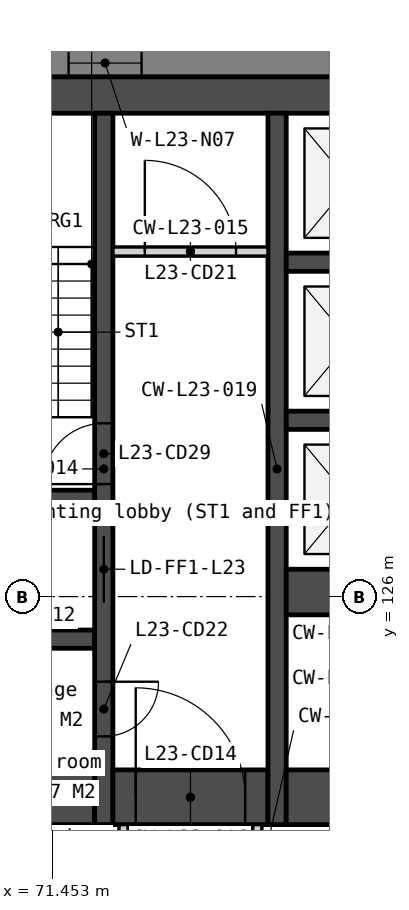
"""IFC4 building model, lengths in metres.
Left out: names, types, materials, properties, quantities, classifications, styles, units other than length and angle.
Written with IfcOpenShell. Run it as: python <this file> out.ifc"""

import sys

from ifc_helpers import new_model, si_unit, direction, frame, frame_2d, origin, place, context, subcontext, project, spatial, polyline, rectangle, outline, extrude, element, fill, save


model = new_model("IFC4")
c1 = context("Model", 3, precision=1e-05, world=origin(), true_north=direction((0.0, 1.0)))
c2 = subcontext(c1, "Body", "Model", "MODEL_VIEW")
j1 = project(units=[si_unit("LENGTHUNIT", "METRE"), si_unit("PLANEANGLEUNIT", "RADIAN")], contexts=[c1])
p1 = place(None, origin())
s1 = spatial("IfcSite", under=j1, at=p1, CompositionType="ELEMENT")
p2 = place(p1, origin())
s2 = spatial("IfcBuilding", under=s1, at=p2, CompositionType="ELEMENT")
p3 = place(p2, frame((0.0, 0.0, 95.8)))
s3 = spatial("IfcBuildingStorey", under=s2, at=p3, CompositionType="ELEMENT", Elevation=95.8)
p4 = place(p3, frame((66.0, 134.25, 0.0), z_axis=(0.0, 0.0, 1.0), x_axis=(1.0, 0.0, 0.0)))
e1 = element("IfcWall", 1, at=p4, inside=s3, PredefinedType="SOLIDWALL", context=c2, shape_type="SweptSolid", body=[
    extrude(rectangle(XDim=28.0, YDim=0.6, at=frame_2d((14.0, 0.0))), origin(), (0.0, 0.0, 1.0), 3.35),
])
for number, where, z_axis, x_axis in (
    (2, (69.6, 127.6, 0.0), (0.0, 0.0, 1.0), (1.0, 0.0, 0.0)),
    (3, (69.6, 125.3, 0.0), (0.0, 0.0, 1.0), (1.0, 0.0, 0.0)),
):
    element("IfcWall", number, at=place(p3, frame(where, z_axis=z_axis, x_axis=x_axis)), inside=s3, PredefinedType="SOLIDWALL", context=c2, shape_type="SweptSolid", body=[
        extrude(rectangle(XDim=2.55, YDim=0.3, at=frame_2d((1.275, 0.0))), origin(), (0.0, 0.0, 1.0), 3.35),
    ])
p5 = place(p3, frame((69.6, 122.7, 0.0), z_axis=(0.0, 0.0, 1.0), x_axis=(1.0, 0.0, 0.0)))
e4 = element("IfcWall", 4, at=p5, inside=s3, PredefinedType="SOLIDWALL", context=c2, shape_type="SweptSolid", body=[
    extrude(rectangle(XDim=2.55, YDim=0.9, at=frame_2d((1.275, 0.0))), origin(), (0.0, 0.0, 1.0), 3.35),
])
p6 = place(p3, frame((72.3, 133.95, 0.0), z_axis=(0.0, 0.0, 1.0), x_axis=(0.0, -1.0, 0.0)))
e5 = element("IfcWall", 5, at=p6, inside=s3, PredefinedType="SOLIDWALL", context=c2, shape_type="SweptSolid", body=[
    extrude(rectangle(XDim=11.7, YDim=0.3, at=frame_2d((5.85, 0.0))), origin(), (0.0, 0.0, 1.0), 3.35),
])
p7 = place(p6, frame((6.95, 0.0, 0.0)))
e6 = element("IfcOpeningElement", 6, at=p7, cuts=e5, PredefinedType="OPENING", context=c2, shape_type="SweptSolid", body=[
    extrude(rectangle(XDim=1.1, YDim=2.1, at=frame_2d((0.55, 1.05))), frame((0.0, 0.16, 0.0), z_axis=(0.0, -1.0, 0.0), x_axis=(1.0, 0.0, 0.0)), (0.0, 0.0, 1.0), 0.32),
])
p8 = place(p6, frame((9.35, 0.0, 0.0)))
e7 = element("IfcOpeningElement", 7, at=p8, cuts=e5, PredefinedType="OPENING", context=c2, shape_type="SweptSolid", body=[
    extrude(rectangle(XDim=0.9, YDim=2.1, at=frame_2d((0.45, 1.05))), frame((0.0, 0.16, 0.0), z_axis=(0.0, -1.0, 0.0), x_axis=(1.0, 0.0, 0.0)), (0.0, 0.0, 1.0), 0.32),
])
p9 = place(p6, frame((5.1, 0.0, 0.0)))
e8 = element("IfcOpeningElement", 8, at=p9, cuts=e5, PredefinedType="OPENING", context=c2, shape_type="SweptSolid", body=[
    extrude(rectangle(XDim=1.0, YDim=2.1, at=frame_2d((0.5, 1.05))), frame((0.0, 0.16, 0.0), z_axis=(0.0, -1.0, 0.0), x_axis=(1.0, 0.0, 0.0)), (0.0, 0.0, 1.0), 0.32),
])
p10 = place(p3, frame((72.45, 131.675, 0.0), z_axis=(0.0, 0.0, 1.0), x_axis=(1.0, 0.0, 0.0)))
e9 = element("IfcWall", 9, at=p10, inside=s3, PredefinedType="PARTITIONING", context=c2, shape_type="SweptSolid", body=[
    extrude(rectangle(XDim=2.55, YDim=0.15, at=frame_2d((1.275, 0.0))), origin(), (0.0, 0.0, 1.0), 3.35),
])
p11 = place(p10, frame((0.525, 0.0, 0.0)))
e10 = element("IfcOpeningElement", 10, at=p11, cuts=e9, PredefinedType="OPENING", context=c2, shape_type="SweptSolid", body=[
    extrude(rectangle(XDim=1.5, YDim=2.1, at=frame_2d((0.75, 1.05))), frame((0.0, 0.085, 0.0), z_axis=(0.0, -1.0, 0.0), x_axis=(1.0, 0.0, 0.0)), (0.0, 0.0, 1.0), 0.17),
])
p12 = place(p3, frame((72.45, 122.7, 0.0), z_axis=(0.0, 0.0, 1.0), x_axis=(1.0, 0.0, 0.0)))
e11 = element("IfcWall", 11, at=p12, inside=s3, PredefinedType="SOLIDWALL", context=c2, shape_type="SweptSolid", body=[
    extrude(rectangle(XDim=2.55, YDim=0.9, at=frame_2d((1.275, 0.0))), origin(), (0.0, 0.0, 1.0), 3.35),
])
p13 = place(p12, frame((0.375, 0.0, 0.0)))
e12 = element("IfcOpeningElement", 12, at=p13, cuts=e11, PredefinedType="OPENING", context=c2, shape_type="SweptSolid", body=[
    extrude(rectangle(XDim=1.8, YDim=2.1, at=frame_2d((0.9, 1.05))), frame((0.0, 0.46, 0.0), z_axis=(0.0, -1.0, 0.0), x_axis=(1.0, 0.0, 0.0)), (0.0, 0.0, 1.0), 0.92),
])
for number, where, z_axis, x_axis in (
    (13, (72.625, 122.25, 0.0), (0.0, 0.0, 1.0), (0.0, -1.0, 0.0)),
    (14, (74.825, 122.25, 0.0), (0.0, 0.0, 1.0), (0.0, -1.0, 0.0)),
):
    element("IfcWall", number, at=place(p3, frame(where, z_axis=z_axis, x_axis=x_axis)), inside=s3, PredefinedType="PARTITIONING", context=c2, shape_type="SweptSolid", body=[
        extrude(rectangle(XDim=2.1, YDim=0.15, at=frame_2d((1.05, 0.0))), origin(), (0.0, 0.0, 1.0), 3.35),
    ])
p14 = place(p3, frame((75.15, 133.95, 0.0), z_axis=(0.0, 0.0, 1.0), x_axis=(0.0, -1.0, 0.0)))
e15 = element("IfcWall", 15, at=p14, inside=s3, PredefinedType="SOLIDWALL", context=c2, shape_type="SweptSolid", body=[
    extrude(rectangle(XDim=11.7, YDim=0.3, at=frame_2d((5.85, 0.0))), origin(), (0.0, 0.0, 1.0), 3.35),
])
for number, where, z_axis, x_axis in (
    (16, (75.3, 131.5, 0.0), (0.0, 0.0, 1.0), (1.0, 0.0, 0.0)),
    (17, (75.3, 128.9, 0.0), (0.0, 0.0, 1.0), (1.0, 0.0, 0.0)),
):
    element("IfcWall", number, at=place(p3, frame(where, z_axis=z_axis, x_axis=x_axis)), inside=s3, PredefinedType="SOLIDWALL", context=c2, shape_type="SweptSolid", body=[
        extrude(rectangle(XDim=2.1, YDim=0.3, at=frame_2d((1.05, 0.0))), origin(), (0.0, 0.0, 1.0), 3.35),
    ])
p15 = place(p3, frame((75.3, 126.075, 0.0), z_axis=(0.0, 0.0, 1.0), x_axis=(1.0, 0.0, 0.0)))
e18 = element("IfcWall", 18, at=p15, inside=s3, PredefinedType="SOLIDWALL", context=c2, shape_type="SweptSolid", body=[
    extrude(rectangle(XDim=2.1, YDim=0.75, at=frame_2d((1.05, 0.0))), origin(), (0.0, 0.0, 1.0), 3.35),
])
p16 = place(p3, frame((75.3, 122.7, 0.0), z_axis=(0.0, 0.0, 1.0), x_axis=(1.0, 0.0, 0.0)))
e19 = element("IfcWall", 19, at=p16, inside=s3, PredefinedType="SOLIDWALL", context=c2, shape_type="SweptSolid", body=[
    extrude(rectangle(XDim=6.2, YDim=0.9, at=frame_2d((3.1, 0.0))), origin(), (0.0, 0.0, 1.0), 3.35),
])
p17 = place(p3, frame((101.322, 134.775, -0.15), z_axis=(0.0, 0.0, 1.0), x_axis=(-1.0, 0.0, 0.0)))
e20 = element("IfcWall", 20, at=p17, inside=s3, PredefinedType="SOLIDWALL", context=c2, shape_type="SweptSolid", body=[
    extrude(outline(polyline([(0.0, 0.0), (0.0, 3.5), (36.779, 3.5), (36.779, 0.0), (0.0, 0.0)])), frame((0.0, 0.225, 0.0), z_axis=(0.0, -1.0, 0.0), x_axis=(1.0, 0.0, 0.0)), (0.0, 0.0, 1.0), 0.45),
])
p18 = place(p17, frame((2.814, 0.0, 1.05)))
e21 = element("IfcOpeningElement", 21, at=p18, cuts=e20, PredefinedType="OPENING", context=c2, shape_type="SweptSolid", body=[
    extrude(rectangle(XDim=1.2, YDim=1.5, at=frame_2d((0.6, 0.75))), frame((0.0, 0.235, 0.0), z_axis=(0.0, -1.0, 0.0), x_axis=(1.0, 0.0, 0.0)), (0.0, 0.0, 1.0), 0.47),
])
p19 = place(p17, frame((4.514, 0.0, 1.05)))
e22 = element("IfcOpeningElement", 22, at=p19, cuts=e20, PredefinedType="OPENING", context=c2, shape_type="SweptSolid", body=[
    extrude(rectangle(XDim=1.2, YDim=1.5, at=frame_2d((0.6, 0.75))), frame((0.0, 0.235, 0.0), z_axis=(0.0, -1.0, 0.0), x_axis=(1.0, 0.0, 0.0)), (0.0, 0.0, 1.0), 0.47),
])
p20 = place(p17, frame((11.343, 0.0, 1.05)))
e23 = element("IfcOpeningElement", 23, at=p20, cuts=e20, PredefinedType="OPENING", context=c2, shape_type="SweptSolid", body=[
    extrude(rectangle(XDim=1.2, YDim=1.5, at=frame_2d((0.6, 0.75))), frame((0.0, 0.235, 0.0), z_axis=(0.0, -1.0, 0.0), x_axis=(1.0, 0.0, 0.0)), (0.0, 0.0, 1.0), 0.47),
])
p21 = place(p17, frame((13.043, 0.0, 1.05)))
e24 = element("IfcOpeningElement", 24, at=p21, cuts=e20, PredefinedType="OPENING", context=c2, shape_type="SweptSolid", body=[
    extrude(rectangle(XDim=1.2, YDim=1.5, at=frame_2d((0.6, 0.75))), frame((0.0, 0.235, 0.0), z_axis=(0.0, -1.0, 0.0), x_axis=(1.0, 0.0, 0.0)), (0.0, 0.0, 1.0), 0.47),
])
p22 = place(p17, frame((19.872, 0.0, 1.05)))
e25 = element("IfcOpeningElement", 25, at=p22, cuts=e20, PredefinedType="OPENING", context=c2, shape_type="SweptSolid", body=[
    extrude(rectangle(XDim=1.2, YDim=1.5, at=frame_2d((0.6, 0.75))), frame((0.0, 0.235, 0.0), z_axis=(0.0, -1.0, 0.0), x_axis=(1.0, 0.0, 0.0)), (0.0, 0.0, 1.0), 0.47),
])
p23 = place(p17, frame((21.572, 0.0, 1.05)))
e26 = element("IfcOpeningElement", 26, at=p23, cuts=e20, PredefinedType="OPENING", context=c2, shape_type="SweptSolid", body=[
    extrude(rectangle(XDim=1.2, YDim=1.5, at=frame_2d((0.6, 0.75))), frame((0.0, 0.235, 0.0), z_axis=(0.0, -1.0, 0.0), x_axis=(1.0, 0.0, 0.0)), (0.0, 0.0, 1.0), 0.47),
])
p24 = place(p17, frame((28.4, 0.0, 1.05)))
e27 = element("IfcOpeningElement", 27, at=p24, cuts=e20, PredefinedType="OPENING", context=c2, shape_type="SweptSolid", body=[
    extrude(rectangle(XDim=1.2, YDim=1.5, at=frame_2d((0.6, 0.75))), frame((0.0, 0.235, 0.0), z_axis=(0.0, -1.0, 0.0), x_axis=(1.0, 0.0, 0.0)), (0.0, 0.0, 1.0), 0.47),
])
p25 = place(p17, frame((30.1, 0.0, 1.05)))
e28 = element("IfcOpeningElement", 28, at=p25, cuts=e20, PredefinedType="OPENING", context=c2, shape_type="SweptSolid", body=[
    extrude(rectangle(XDim=1.2, YDim=1.5, at=frame_2d((0.6, 0.75))), frame((0.0, 0.235, 0.0), z_axis=(0.0, -1.0, 0.0), x_axis=(1.0, 0.0, 0.0)), (0.0, 0.0, 1.0), 0.47),
])
p26 = place(p3, frame((56.073, 130.263, -0.15), z_axis=(0.0, 0.0, 1.0), x_axis=(0.500000478905, -0.866025127289, 0.0)))
e29 = element("IfcWall", 29, at=p26, inside=s3, PredefinedType="SOLIDWALL", context=c2, shape_type="SweptSolid", body=[
    extrude(outline(polyline([(42.643, 0.0), (42.643, 3.5), (0.0, 3.5), (0.0, 0.0), (42.643, 0.0)])), frame((0.0, 0.225, 0.0), z_axis=(0.0, -1.0, 0.0), x_axis=(1.0, 0.0, 0.0)), (0.0, 0.0, 1.0), 0.45),
])
p27 = place(p26, frame((2.814, 0.0, 1.05)))
e30 = element("IfcOpeningElement", 30, at=p27, cuts=e29, PredefinedType="OPENING", context=c2, shape_type="SweptSolid", body=[
    extrude(rectangle(XDim=1.2, YDim=1.5, at=frame_2d((0.6, 0.75))), frame((0.0, 0.235, 0.0), z_axis=(0.0, -1.0, 0.0), x_axis=(1.0, 0.0, 0.0)), (0.0, 0.0, 1.0), 0.47),
])
p28 = place(p26, frame((4.514, 0.0, 1.05)))
e31 = element("IfcOpeningElement", 31, at=p28, cuts=e29, PredefinedType="OPENING", context=c2, shape_type="SweptSolid", body=[
    extrude(rectangle(XDim=1.2, YDim=1.5, at=frame_2d((0.6, 0.75))), frame((0.0, 0.235, 0.0), z_axis=(0.0, -1.0, 0.0), x_axis=(1.0, 0.0, 0.0)), (0.0, 0.0, 1.0), 0.47),
])
p29 = place(p26, frame((11.343, 0.0, 1.05)))
e32 = element("IfcOpeningElement", 32, at=p29, cuts=e29, PredefinedType="OPENING", context=c2, shape_type="SweptSolid", body=[
    extrude(rectangle(XDim=1.2, YDim=1.5, at=frame_2d((0.6, 0.75))), frame((0.0, 0.235, 0.0), z_axis=(0.0, -1.0, 0.0), x_axis=(1.0, 0.0, 0.0)), (0.0, 0.0, 1.0), 0.47),
])
p30 = place(p26, frame((13.043, 0.0, 1.05)))
e33 = element("IfcOpeningElement", 33, at=p30, cuts=e29, PredefinedType="OPENING", context=c2, shape_type="SweptSolid", body=[
    extrude(rectangle(XDim=1.2, YDim=1.5, at=frame_2d((0.6, 0.75))), frame((0.0, 0.235, 0.0), z_axis=(0.0, -1.0, 0.0), x_axis=(1.0, 0.0, 0.0)), (0.0, 0.0, 1.0), 0.47),
])
p31 = place(p26, frame((19.872, 0.0, 1.05)))
e34 = element("IfcOpeningElement", 34, at=p31, cuts=e29, PredefinedType="OPENING", context=c2, shape_type="SweptSolid", body=[
    extrude(rectangle(XDim=1.2, YDim=1.5, at=frame_2d((0.6, 0.75))), frame((0.0, 0.235, 0.0), z_axis=(0.0, -1.0, 0.0), x_axis=(1.0, 0.0, 0.0)), (0.0, 0.0, 1.0), 0.47),
])
p32 = place(p26, frame((21.572, 0.0, 1.05)))
e35 = element("IfcOpeningElement", 35, at=p32, cuts=e29, PredefinedType="OPENING", context=c2, shape_type="SweptSolid", body=[
    extrude(rectangle(XDim=1.2, YDim=1.5, at=frame_2d((0.6, 0.75))), frame((0.0, 0.235, 0.0), z_axis=(0.0, -1.0, 0.0), x_axis=(1.0, 0.0, 0.0)), (0.0, 0.0, 1.0), 0.47),
])
p33 = place(p26, frame((28.4, 0.0, 1.05)))
e36 = element("IfcOpeningElement", 36, at=p33, cuts=e29, PredefinedType="OPENING", context=c2, shape_type="SweptSolid", body=[
    extrude(rectangle(XDim=1.2, YDim=1.5, at=frame_2d((0.6, 0.75))), frame((0.0, 0.235, 0.0), z_axis=(0.0, -1.0, 0.0), x_axis=(1.0, 0.0, 0.0)), (0.0, 0.0, 1.0), 0.47),
])
p34 = place(p26, frame((30.1, 0.0, 1.05)))
e37 = element("IfcOpeningElement", 37, at=p34, cuts=e29, PredefinedType="OPENING", context=c2, shape_type="SweptSolid", body=[
    extrude(rectangle(XDim=1.2, YDim=1.5, at=frame_2d((0.6, 0.75))), frame((0.0, 0.235, 0.0), z_axis=(0.0, -1.0, 0.0), x_axis=(1.0, 0.0, 0.0)), (0.0, 0.0, 1.0), 0.47),
])
p35 = place(p26, frame((36.929, 0.0, 1.05)))
e38 = element("IfcOpeningElement", 38, at=p35, cuts=e29, PredefinedType="OPENING", context=c2, shape_type="SweptSolid", body=[
    extrude(rectangle(XDim=1.2, YDim=1.5, at=frame_2d((0.6, 0.75))), frame((0.0, 0.235, 0.0), z_axis=(0.0, -1.0, 0.0), x_axis=(1.0, 0.0, 0.0)), (0.0, 0.0, 1.0), 0.47),
])
p36 = place(p26, frame((38.629, 0.0, 1.05)))
e39 = element("IfcOpeningElement", 39, at=p36, cuts=e29, PredefinedType="OPENING", context=c2, shape_type="SweptSolid", body=[
    extrude(rectangle(XDim=1.2, YDim=1.5, at=frame_2d((0.6, 0.75))), frame((0.0, 0.235, 0.0), z_axis=(0.0, -1.0, 0.0), x_axis=(1.0, 0.0, 0.0)), (0.0, 0.0, 1.0), 0.47),
])
p37 = place(p7, origin())
e40 = element("IfcDoor", 40, at=p37, inside=s3, OperationType="SLIDING_TO_LEFT", PredefinedType="DOOR", context=c2, shape_type="SweptSolid", body=[
    extrude(rectangle(XDim=1.1, YDim=2.1, at=frame_2d((0.55, 1.05))), frame((0.0, 0.025, 0.0), z_axis=(0.0, -1.0, 0.0), x_axis=(1.0, 0.0, 0.0)), (0.0, 0.0, 1.0), 0.05),
])
fill(e6, e40)
p38 = place(p13, origin())
e41 = element("IfcDoor", 41, at=p38, inside=s3, OperationType="DOUBLE_DOOR_DOUBLE_SWING", PredefinedType="DOOR", context=c2, shape_type="SweptSolid", body=[
    extrude(rectangle(XDim=1.8, YDim=2.1, at=frame_2d((0.9, 1.05))), frame((0.0, 0.025, 0.0), z_axis=(0.0, -1.0, 0.0), x_axis=(1.0, 0.0, 0.0)), (0.0, 0.0, 1.0), 0.05),
])
fill(e12, e41)
p39 = place(p11, origin())
e42 = element("IfcDoor", 42, at=p39, inside=s3, OperationType="DOUBLE_DOOR_DOUBLE_SWING", PredefinedType="DOOR", context=c2, shape_type="SweptSolid", body=[
    extrude(rectangle(XDim=1.5, YDim=2.1, at=frame_2d((0.75, 1.05))), frame((0.0, 0.025, 0.0), z_axis=(0.0, -1.0, 0.0), x_axis=(1.0, 0.0, 0.0)), (0.0, 0.0, 1.0), 0.05),
])
fill(e10, e42)
p40 = place(p8, origin())
e43 = element("IfcDoor", 43, at=p40, inside=s3, OperationType="SINGLE_SWING_LEFT", PredefinedType="DOOR", context=c2, shape_type="SweptSolid", body=[
    extrude(rectangle(XDim=0.9, YDim=2.1, at=frame_2d((0.45, 1.05))), frame((0.0, 0.025, 0.0), z_axis=(0.0, -1.0, 0.0), x_axis=(1.0, 0.0, 0.0)), (0.0, 0.0, 1.0), 0.05),
])
fill(e7, e43)
p41 = place(p9, origin())
e44 = element("IfcDoor", 44, at=p41, inside=s3, OperationType="SINGLE_SWING_RIGHT", PredefinedType="DOOR", context=c2, shape_type="SweptSolid", body=[
    extrude(rectangle(XDim=1.0, YDim=2.1, at=frame_2d((0.5, 1.05))), frame((0.0, 0.025, 0.0), z_axis=(0.0, -1.0, 0.0), x_axis=(1.0, 0.0, 0.0)), (0.0, 0.0, 1.0), 0.05),
])
fill(e8, e44)
p42 = place(p24, origin())
e45 = element("IfcWindow", 45, at=p42, inside=s3, PartitioningType="SINGLE_PANEL", PredefinedType="WINDOW", context=c2, shape_type="SweptSolid", body=[
    extrude(rectangle(XDim=1.2, YDim=1.5, at=frame_2d((0.6, 0.75))), frame((0.0, 0.03, 0.0), z_axis=(0.0, -1.0, 0.0), x_axis=(1.0, 0.0, 0.0)), (0.0, 0.0, 1.0), 0.06),
])
fill(e27, e45)
save(model, sys.argv[1])
